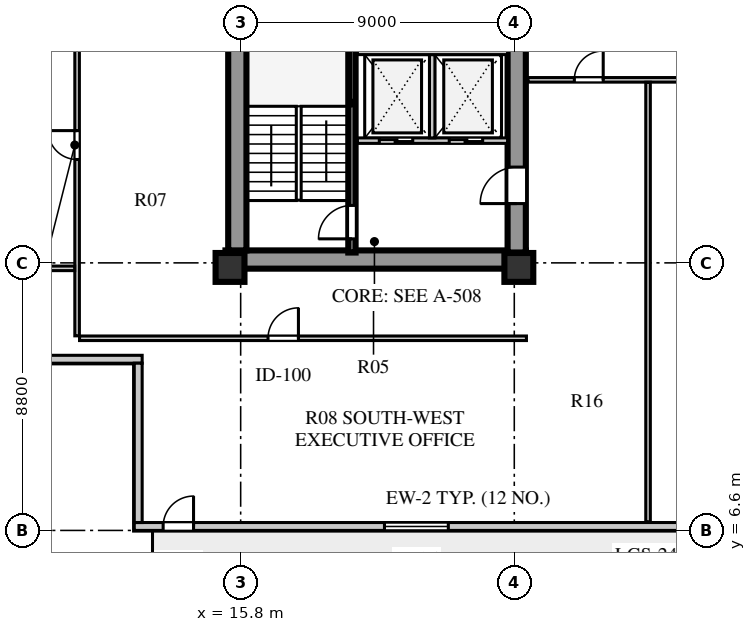
"""IFC4 building model, lengths in metres.
Left out: names, types, materials, properties, quantities, classifications, styles, units other than length and angle.
Written with IfcOpenShell. Run it as: python <this file> out.ifc"""

import sys

from ifc_helpers import new_model, si_unit, direction, frame, frame_2d, origin, origin_2d, place, context, subcontext, project, spatial, rectangle, extrude, element, fill, save


model = new_model("IFC4")
c1 = context("Model", 3, precision=1e-05, world=origin(), true_north=direction((0.0, 1.0)))
c2 = subcontext(c1, "Body", "Model", "MODEL_VIEW")
j1 = project(units=[si_unit("LENGTHUNIT", "METRE"), si_unit("PLANEANGLEUNIT", "RADIAN")], contexts=[c1])
p1 = place(None, origin())
s1 = spatial("IfcSite", under=j1, at=p1, CompositionType="ELEMENT")
p2 = place(p1, origin())
s2 = spatial("IfcBuilding", under=s1, at=p2, CompositionType="ELEMENT")
p3 = place(p2, frame((0.0, 0.0, 58.0)))
s3 = spatial("IfcBuildingStorey", under=s2, at=p3, CompositionType="ELEMENT", Elevation=58.0)
p4 = place(p3, frame((15.3, 15.51, 0.0), z_axis=(0.0, 0.0, 1.0), x_axis=(1.0, 0.0, 0.0)))
e1 = element("IfcWall", 1, at=p4, inside=s3, PredefinedType="SHEAR", context=c2, shape_type="SweptSolid", body=[
    extrude(rectangle(XDim=9.88, YDim=0.6, at=frame_2d((4.94, 0.0))), origin(), (0.0, 0.0, 1.0), 3.72),
])
p5 = place(p3, frame((15.69, 15.81, 0.0), z_axis=(0.0, 0.0, 1.0), x_axis=(0.0, 1.0, 0.0)))
e2 = element("IfcWall", 2, at=p5, inside=s3, PredefinedType="SHEAR", context=c2, shape_type="SweptSolid", body=[
    extrude(rectangle(XDim=25.63, YDim=0.6, at=frame_2d((12.815, 0.0))), origin(), (0.0, 0.0, 1.0), 3.72),
])
p6 = place(p3, frame((24.88, 15.74, 0.0), z_axis=(0.0, 0.0, 1.0), x_axis=(0.0, 1.0, 0.0)))
e3 = element("IfcWall", 3, at=p6, inside=s3, PredefinedType="SHEAR", context=c2, shape_type="SweptSolid", body=[
    extrude(rectangle(XDim=25.76, YDim=0.6, at=frame_2d((12.88, 0.0))), origin(), (0.0, 0.0, 1.0), 3.72),
])
p7 = place(p6, frame((1.61, 0.0, 0.0)))
e4 = element("IfcOpeningElement", 4, at=p7, cuts=e3, PredefinedType="OPENING", context=c2, shape_type="SweptSolid", body=[
    extrude(rectangle(XDim=1.2, YDim=2.1, at=frame_2d((0.6, 1.05))), frame((0.0, 0.31, 0.0), z_axis=(0.0, -1.0, 0.0), x_axis=(1.0, 0.0, 0.0)), (0.0, 0.0, 1.0), 0.62),
])
p8 = place(p6, frame((6.78, 0.0, 0.0)))
e5 = element("IfcOpeningElement", 5, at=p8, cuts=e3, PredefinedType="OPENING", context=c2, shape_type="SweptSolid", body=[
    extrude(rectangle(XDim=0.85, YDim=2.06, at=frame_2d((0.425, 1.03))), frame((0.0, 0.31, 0.0), z_axis=(0.0, -1.0, 0.0), x_axis=(1.0, 0.0, 0.0)), (0.0, 0.0, 1.0), 0.62),
])
p9 = place(p6, frame((12.11, 0.0, 0.0)))
e6 = element("IfcOpeningElement", 6, at=p9, cuts=e3, PredefinedType="OPENING", context=c2, shape_type="SweptSolid", body=[
    extrude(rectangle(XDim=1.5, YDim=2.12, at=frame_2d((0.75, 1.06))), frame((0.0, 0.31, 0.0), z_axis=(0.0, -1.0, 0.0), x_axis=(1.0, 0.0, 0.0)), (0.0, 0.0, 1.0), 0.62),
])
p10 = place(p6, frame((20.11, 0.0, 0.0)))
e7 = element("IfcOpeningElement", 7, at=p10, cuts=e3, PredefinedType="OPENING", context=c2, shape_type="SweptSolid", body=[
    extrude(rectangle(XDim=1.2, YDim=2.12, at=frame_2d((0.6, 1.06))), frame((0.0, 0.31, 0.0), z_axis=(0.0, -1.0, 0.0), x_axis=(1.0, 0.0, 0.0)), (0.0, 0.0, 1.0), 0.62),
])
p11 = place(p6, frame((24.01, 0.0, 0.0)))
e8 = element("IfcOpeningElement", 8, at=p11, cuts=e3, PredefinedType="OPENING", context=c2, shape_type="SweptSolid", body=[
    extrude(rectangle(XDim=0.95, YDim=2.1, at=frame_2d((0.475, 1.05))), frame((0.0, 0.31, 0.0), z_axis=(0.0, -1.0, 0.0), x_axis=(1.0, 0.0, 0.0)), (0.0, 0.0, 1.0), 0.62),
])
for number, where, z_axis, x_axis in (
    (9, (15.45, 15.25, 0.0), (0.0, 0.0, 1.0), (1.0, 0.0, 0.0)),
    (10, (24.95, 15.25, 0.0), (0.0, 0.0, 1.0), (1.0, 0.0, 0.0)),
):
    element("IfcColumn", number, at=place(p3, frame(where, z_axis=z_axis, x_axis=x_axis)), inside=s3, PredefinedType="COLUMN", context=c2, shape_type="SweptSolid", body=[
        extrude(rectangle(XDim=0.95, YDim=0.95, at=origin_2d()), origin(), (0.0, 0.0, 1.0), 3.72),
    ])
p12 = place(p3, frame((12.3, 6.73, 0.0), z_axis=(0.0, 0.0, 1.0), x_axis=(1.0, 0.0, 0.0)))
e11 = element("IfcWall", 11, at=p12, inside=s3, PredefinedType="SOLIDWALL", context=c2, shape_type="SweptSolid", body=[
    extrude(rectangle(XDim=34.0, YDim=0.26, at=frame_2d((17.0, 0.0))), origin(), (0.0, 0.0, 1.0), 3.72),
])
p13 = place(p12, frame((0.95, 0.0, 0.0)))
e12 = element("IfcOpeningElement", 12, at=p13, cuts=e11, PredefinedType="OPENING", context=c2, shape_type="SweptSolid", body=[
    extrude(rectangle(XDim=1.0, YDim=2.05, at=frame_2d((0.5, 1.025))), frame((0.0, 0.14, 0.0), z_axis=(0.0, -1.0, 0.0), x_axis=(1.0, 0.0, 0.0)), (0.0, 0.0, 1.0), 0.28),
])
p14 = place(p12, frame((8.23, 0.0, 0.8)))
e13 = element("IfcOpeningElement", 13, at=p14, cuts=e11, PredefinedType="OPENING", context=c2, shape_type="SweptSolid", body=[
    extrude(rectangle(XDim=2.1, YDim=1.95, at=frame_2d((1.05, 0.975))), frame((0.0, 0.14, 0.0), z_axis=(0.0, -1.0, 0.0), x_axis=(1.0, 0.0, 0.0)), (0.0, 0.0, 1.0), 0.28),
])
p15 = place(p12, frame((18.525, 0.0, 0.8)))
e14 = element("IfcOpeningElement", 14, at=p15, cuts=e11, PredefinedType="OPENING", context=c2, shape_type="SweptSolid", body=[
    extrude(rectangle(XDim=1.35, YDim=1.9, at=frame_2d((0.675, 0.95))), frame((0.0, 0.14, 0.0), z_axis=(0.0, -1.0, 0.0), x_axis=(1.0, 0.0, 0.0)), (0.0, 0.0, 1.0), 0.28),
])
p16 = place(p12, frame((22.835, 0.0, 0.8)))
e15 = element("IfcOpeningElement", 15, at=p16, cuts=e11, PredefinedType="OPENING", context=c2, shape_type="SweptSolid", body=[
    extrude(rectangle(XDim=1.65, YDim=1.95, at=frame_2d((0.825, 0.975))), frame((0.0, 0.14, 0.0), z_axis=(0.0, -1.0, 0.0), x_axis=(1.0, 0.0, 0.0)), (0.0, 0.0, 1.0), 0.28),
])
p17 = place(p12, frame((28.88, 0.0, 0.8)))
e16 = element("IfcOpeningElement", 16, at=p17, cuts=e11, PredefinedType="OPENING", context=c2, shape_type="SweptSolid", body=[
    extrude(rectangle(XDim=1.95, YDim=2.0, at=frame_2d((0.975, 1.0))), frame((0.0, 0.14, 0.0), z_axis=(0.0, -1.0, 0.0), x_axis=(1.0, 0.0, 0.0)), (0.0, 0.0, 1.0), 0.28),
])
p18 = place(p3, frame((6.8, 12.23, 0.0), z_axis=(0.0, 0.0, 1.0), x_axis=(1.0, 0.0, 0.0)))
e17 = element("IfcWall", 17, at=p18, inside=s3, PredefinedType="SOLIDWALL", context=c2, shape_type="SweptSolid", body=[
    extrude(rectangle(XDim=5.76, YDim=0.26, at=frame_2d((2.88, 0.0))), origin(), (0.0, 0.0, 1.0), 3.72),
])
p19 = place(p3, frame((12.43, 12.1, 0.0), z_axis=(0.0, 0.0, 1.0), x_axis=(0.0, -1.0, 0.0)))
e18 = element("IfcWall", 18, at=p19, inside=s3, PredefinedType="SOLIDWALL", context=c2, shape_type="SweptSolid", body=[
    extrude(rectangle(XDim=5.24, YDim=0.26, at=frame_2d((2.62, 0.0))), origin(), (0.0, 0.0, 1.0), 3.72),
])
p20 = place(p3, frame((19.46, 15.74, 0.0), z_axis=(0.0, 0.0, 1.0), x_axis=(0.0, 1.0, 0.0)))
e19 = element("IfcWall", 19, at=p20, inside=s3, PredefinedType="SHEAR", context=c2, shape_type="SweptSolid", body=[
    extrude(rectangle(XDim=8.2, YDim=0.24, at=frame_2d((4.1, 0.0))), origin(), (0.0, 0.0, 1.0), 4.0),
])
p21 = place(p20, frame((0.45, 0.0, 0.0)))
e20 = element("IfcOpeningElement", 20, at=p21, cuts=e19, PredefinedType="OPENING", context=c2, shape_type="SweptSolid", body=[
    extrude(rectangle(XDim=1.1, YDim=2.1, at=frame_2d((0.55, 1.05))), frame((0.0, 0.13, 0.0), z_axis=(0.0, -1.0, 0.0), x_axis=(1.0, 0.0, 0.0)), (0.0, 0.0, 1.0), 0.26),
])
p22 = place(p3, frame((19.64, 19.42, 0.0), z_axis=(0.0, 0.0, 1.0), x_axis=(1.0, 0.0, 0.0)))
e21 = element("IfcWall", 21, at=p22, inside=s3, PredefinedType="SOLIDWALL", context=c2, shape_type="SweptSolid", body=[
    extrude(rectangle(XDim=4.94, YDim=0.18, at=frame_2d((2.47, 0.0))), origin(), (0.0, 0.0, 1.0), 3.72),
])
p23 = place(p22, frame((0.72, 0.0, 0.0)))
e22 = element("IfcOpeningElement", 22, at=p23, cuts=e21, PredefinedType="OPENING", context=c2, shape_type="SweptSolid", body=[
    extrude(rectangle(XDim=1.1, YDim=2.1, at=frame_2d((0.55, 1.05))), frame((0.0, 0.1, 0.0), z_axis=(0.0, -1.0, 0.0), x_axis=(1.0, 0.0, 0.0)), (0.0, 0.0, 1.0), 0.2),
])
p24 = place(p22, frame((3.02, 0.0, 0.0)))
e23 = element("IfcOpeningElement", 23, at=p24, cuts=e21, PredefinedType="OPENING", context=c2, shape_type="SweptSolid", body=[
    extrude(rectangle(XDim=1.1, YDim=2.1, at=frame_2d((0.55, 1.05))), frame((0.0, 0.1, 0.0), z_axis=(0.0, -1.0, 0.0), x_axis=(1.0, 0.0, 0.0)), (0.0, 0.0, 1.0), 0.2),
])
p25 = place(p3, frame((22.1, 19.51, 0.0), z_axis=(0.0, 0.0, 1.0), x_axis=(0.0, 1.0, 0.0)))
e24 = element("IfcWall", 24, at=p25, inside=s3, PredefinedType="SOLIDWALL", context=c2, shape_type="SweptSolid", body=[
    extrude(rectangle(XDim=2.74, YDim=0.18, at=frame_2d((1.37, 0.0))), origin(), (0.0, 0.0, 1.0), 3.72),
])
p26 = place(p3, frame((19.64, 22.34, 0.0), z_axis=(0.0, 0.0, 1.0), x_axis=(1.0, 0.0, 0.0)))
e25 = element("IfcWall", 25, at=p26, inside=s3, PredefinedType="SOLIDWALL", context=c2, shape_type="SweptSolid", body=[
    extrude(rectangle(XDim=4.94, YDim=0.18, at=frame_2d((2.47, 0.0))), origin(), (0.0, 0.0, 1.0), 3.72),
])
p27 = place(p3, frame((25.25, 21.42, 0.0), z_axis=(0.0, 0.0, 1.0), x_axis=(1.0, 0.0, 0.0)))
e26 = element("IfcWall", 26, at=p27, inside=s3, PredefinedType="PARTITIONING", context=c2, shape_type="SweptSolid", body=[
    extrude(rectangle(XDim=12.87, YDim=0.15, at=frame_2d((6.435, 0.0))), origin(), (0.0, 0.0, 1.0), 3.32),
])
p28 = place(p27, frame((1.525, 0.0, 0.0)))
e27 = element("IfcOpeningElement", 27, at=p28, cuts=e26, PredefinedType="OPENING", context=c2, shape_type="SweptSolid", body=[
    extrude(rectangle(XDim=0.95, YDim=2.08, at=frame_2d((0.475, 1.04))), frame((0.0, 0.085, 0.0), z_axis=(0.0, -1.0, 0.0), x_axis=(1.0, 0.0, 0.0)), (0.0, 0.0, 1.0), 0.17),
])
p29 = place(p27, frame((5.775, 0.0, 0.0)))
e28 = element("IfcOpeningElement", 28, at=p29, cuts=e26, PredefinedType="OPENING", context=c2, shape_type="SweptSolid", body=[
    extrude(rectangle(XDim=0.95, YDim=2.08, at=frame_2d((0.475, 1.04))), frame((0.0, 0.085, 0.0), z_axis=(0.0, -1.0, 0.0), x_axis=(1.0, 0.0, 0.0)), (0.0, 0.0, 1.0), 0.17),
])
p30 = place(p27, frame((10.195, 0.0, 0.0)))
e29 = element("IfcOpeningElement", 29, at=p30, cuts=e26, PredefinedType="OPENING", context=c2, shape_type="SweptSolid", body=[
    extrude(rectangle(XDim=0.95, YDim=2.08, at=frame_2d((0.475, 1.04))), frame((0.0, 0.085, 0.0), z_axis=(0.0, -1.0, 0.0), x_axis=(1.0, 0.0, 0.0)), (0.0, 0.0, 1.0), 0.17),
])
p31 = place(p3, frame((10.42, 13.0, 0.0), z_axis=(0.0, 0.0, 1.0), x_axis=(0.0, 1.0, 0.0)))
e30 = element("IfcWall", 30, at=p31, inside=s3, PredefinedType="PARTITIONING", context=c2, shape_type="SweptSolid", body=[
    extrude(rectangle(XDim=31.2, YDim=0.15, at=frame_2d((15.6, 0.0))), origin(), (0.0, 0.0, 1.0), 3.72),
])
p32 = place(p31, frame((5.8, 0.0, 0.0)))
e31 = element("IfcOpeningElement", 31, at=p32, cuts=e30, PredefinedType="OPENING", context=c2, shape_type="SweptSolid", body=[
    extrude(rectangle(XDim=0.95, YDim=2.08, at=frame_2d((0.475, 1.04))), frame((0.0, 0.085, 0.0), z_axis=(0.0, -1.0, 0.0), x_axis=(1.0, 0.0, 0.0)), (0.0, 0.0, 1.0), 0.17),
])
p33 = place(p31, frame((15.05, 0.0, 0.0)))
e32 = element("IfcOpeningElement", 32, at=p33, cuts=e30, PredefinedType="OPENING", context=c2, shape_type="SweptSolid", body=[
    extrude(rectangle(XDim=0.95, YDim=2.08, at=frame_2d((0.475, 1.04))), frame((0.0, 0.085, 0.0), z_axis=(0.0, -1.0, 0.0), x_axis=(1.0, 0.0, 0.0)), (0.0, 0.0, 1.0), 0.17),
])
p34 = place(p31, frame((24.4, 0.0, 0.0)))
e33 = element("IfcOpeningElement", 33, at=p34, cuts=e30, PredefinedType="OPENING", context=c2, shape_type="SweptSolid", body=[
    extrude(rectangle(XDim=0.95, YDim=2.08, at=frame_2d((0.475, 1.04))), frame((0.0, 0.085, 0.0), z_axis=(0.0, -1.0, 0.0), x_axis=(1.0, 0.0, 0.0)), (0.0, 0.0, 1.0), 0.17),
])
p35 = place(p3, frame((7.08, 15.22, 0.0), z_axis=(0.0, 0.0, 1.0), x_axis=(1.0, 0.0, 0.0)))
e34 = element("IfcWall", 34, at=p35, inside=s3, PredefinedType="PARTITIONING", context=c2, shape_type="SweptSolid", body=[
    extrude(rectangle(XDim=3.26, YDim=0.15, at=frame_2d((1.63, 0.0))), origin(), (0.0, 0.0, 1.0), 3.22),
])
p36 = place(p3, frame((10.5, 12.92, 0.0), z_axis=(0.0, 0.0, 1.0), x_axis=(1.0, 0.0, 0.0)))
e35 = element("IfcWall", 35, at=p36, inside=s3, PredefinedType="PARTITIONING", context=c2, shape_type="SweptSolid", body=[
    extrude(rectangle(XDim=14.7, YDim=0.15, at=frame_2d((7.35, 0.0))), origin(), (0.0, 0.0, 1.0), 3.72),
])
p37 = place(p36, frame((6.2, 0.0, 0.0)))
e36 = element("IfcOpeningElement", 36, at=p37, cuts=e35, PredefinedType="OPENING", context=c2, shape_type="SweptSolid", body=[
    extrude(rectangle(XDim=1.0, YDim=2.08, at=frame_2d((0.5, 1.04))), frame((0.0, 0.085, 0.0), z_axis=(0.0, -1.0, 0.0), x_axis=(1.0, 0.0, 0.0)), (0.0, 0.0, 1.0), 0.17),
])
p38 = place(p3, frame((29.2, 6.88, 0.0), z_axis=(0.0, 0.0, 1.0), x_axis=(0.0, 1.0, 0.0)))
e37 = element("IfcWall", 37, at=p38, inside=s3, PredefinedType="PARTITIONING", context=c2, shape_type="SweptSolid", body=[
    extrude(rectangle(XDim=14.46, YDim=0.15, at=frame_2d((7.23, 0.0))), origin(), (0.0, 0.0, 1.0), 3.72),
])
p39 = place(p13, frame((1.0, 0.0, 0.0), z_axis=(0.0, 0.0, 1.0), x_axis=(-1.0, 0.0, 0.0)))
e38 = element("IfcDoor", 38, at=p39, inside=s3, OperationType="SINGLE_SWING_LEFT", PredefinedType="DOOR", context=c2, shape_type="SweptSolid", body=[
    extrude(rectangle(XDim=1.0, YDim=2.05, at=frame_2d((0.5, 1.025))), frame((0.0, 0.025, 0.0), z_axis=(0.0, -1.0, 0.0), x_axis=(1.0, 0.0, 0.0)), (0.0, 0.0, 1.0), 0.05),
])
fill(e12, e38)
p40 = place(p14, origin())
e39 = element("IfcWindow", 39, at=p40, inside=s3, PartitioningType="SINGLE_PANEL", PredefinedType="WINDOW", context=c2, shape_type="SweptSolid", body=[
    extrude(rectangle(XDim=2.1, YDim=1.95, at=frame_2d((1.05, 0.975))), frame((0.0, 0.03, 0.0), z_axis=(0.0, -1.0, 0.0), x_axis=(1.0, 0.0, 0.0)), (0.0, 0.0, 1.0), 0.06),
])
fill(e13, e39)
p41 = place(p21, origin())
e40 = element("IfcDoor", 40, at=p41, inside=s3, OperationType="SINGLE_SWING_LEFT", PredefinedType="DOOR", context=c2, shape_type="SweptSolid", body=[
    extrude(rectangle(XDim=1.1, YDim=2.1, at=frame_2d((0.55, 1.05))), frame((0.0, 0.025, 0.0), z_axis=(0.0, -1.0, 0.0), x_axis=(1.0, 0.0, 0.0)), (0.0, 0.0, 1.0), 0.05),
])
fill(e20, e40)
p42 = place(p23, origin())
e41 = element("IfcDoor", 41, at=p42, inside=s3, OperationType="DOUBLE_DOOR_SLIDING", PredefinedType="DOOR", context=c2, shape_type="SweptSolid", body=[
    extrude(rectangle(XDim=1.1, YDim=2.1, at=frame_2d((0.55, 1.05))), frame((0.0, 0.025, 0.0), z_axis=(0.0, -1.0, 0.0), x_axis=(1.0, 0.0, 0.0)), (0.0, 0.0, 1.0), 0.05),
])
fill(e22, e41)
p43 = place(p24, origin())
e42 = element("IfcDoor", 42, at=p43, inside=s3, OperationType="DOUBLE_DOOR_SLIDING", PredefinedType="DOOR", context=c2, shape_type="SweptSolid", body=[
    extrude(rectangle(XDim=1.1, YDim=2.1, at=frame_2d((0.55, 1.05))), frame((0.0, 0.025, 0.0), z_axis=(0.0, -1.0, 0.0), x_axis=(1.0, 0.0, 0.0)), (0.0, 0.0, 1.0), 0.05),
])
fill(e23, e42)
p44 = place(p7, frame((1.2, 0.0, 0.0), z_axis=(0.0, 0.0, 1.0), x_axis=(-1.0, 0.0, 0.0)))
e43 = element("IfcDoor", 43, at=p44, inside=s3, OperationType="SINGLE_SWING_RIGHT", PredefinedType="DOOR", context=c2, shape_type="SweptSolid", body=[
    extrude(rectangle(XDim=1.2, YDim=2.1, at=frame_2d((0.6, 1.05))), frame((0.0, 0.025, 0.0), z_axis=(0.0, -1.0, 0.0), x_axis=(1.0, 0.0, 0.0)), (0.0, 0.0, 1.0), 0.05),
])
fill(e4, e43)
p45 = place(p37, frame((1.0, 0.0, 0.0), z_axis=(0.0, 0.0, 1.0), x_axis=(-1.0, 0.0, 0.0)))
e44 = element("IfcDoor", 44, at=p45, inside=s3, OperationType="SINGLE_SWING_LEFT", PredefinedType="DOOR", context=c2, shape_type="SweptSolid", body=[
    extrude(rectangle(XDim=1.0, YDim=2.08, at=frame_2d((0.5, 1.04))), frame((0.0, 0.025, 0.0), z_axis=(0.0, -1.0, 0.0), x_axis=(1.0, 0.0, 0.0)), (0.0, 0.0, 1.0), 0.05),
])
fill(e36, e44)
p46 = place(p32, frame((0.95, 0.0, 0.0), z_axis=(0.0, 0.0, 1.0), x_axis=(-1.0, 0.0, 0.0)))
e45 = element("IfcDoor", 45, at=p46, inside=s3, OperationType="SINGLE_SWING_LEFT", PredefinedType="DOOR", context=c2, shape_type="SweptSolid", body=[
    extrude(rectangle(XDim=0.95, YDim=2.08, at=frame_2d((0.475, 1.04))), frame((0.0, 0.025, 0.0), z_axis=(0.0, -1.0, 0.0), x_axis=(1.0, 0.0, 0.0)), (0.0, 0.0, 1.0), 0.05),
])
fill(e31, e45)
p47 = place(p28, frame((0.95, 0.0, 0.0), z_axis=(0.0, 0.0, 1.0), x_axis=(-1.0, 0.0, 0.0)))
e46 = element("IfcDoor", 46, at=p47, inside=s3, OperationType="SINGLE_SWING_LEFT", PredefinedType="DOOR", context=c2, shape_type="SweptSolid", body=[
    extrude(rectangle(XDim=0.95, YDim=2.08, at=frame_2d((0.475, 1.04))), frame((0.0, 0.025, 0.0), z_axis=(0.0, -1.0, 0.0), x_axis=(1.0, 0.0, 0.0)), (0.0, 0.0, 1.0), 0.05),
])
fill(e27, e46)
save(model, sys.argv[1])
